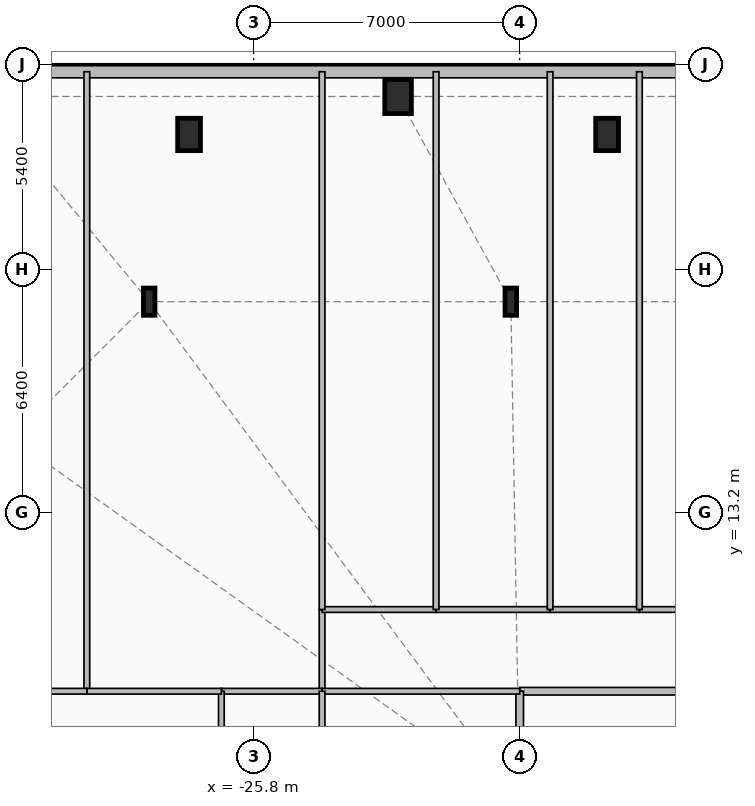
"""IFC4 building model, lengths in metres.
Left out: names, types, materials, properties, quantities, classifications, styles, units other than length and angle.
Written with IfcOpenShell. Run it as: python <this file> out.ifc"""

import sys

from ifc_helpers import new_model, si_unit, direction, frame, frame_2d, origin, origin_2d, place, context, subcontext, project, spatial, rectangle, i_section, extrude, element, fill, save


model = new_model("IFC4")
c1 = context("Model", 3, precision=1e-05, world=origin(), true_north=direction((0.0, 1.0)))
c2 = subcontext(c1, "Body", "Model", "MODEL_VIEW")
j1 = project(units=[si_unit("LENGTHUNIT", "METRE"), si_unit("PLANEANGLEUNIT", "RADIAN")], contexts=[c1])
p1 = place(None, origin())
s1 = spatial("IfcSite", under=j1, at=p1, CompositionType="ELEMENT")
p2 = place(p1, origin())
s2 = spatial("IfcBuilding", under=s1, at=p2, CompositionType="ELEMENT")
p3 = place(p2, frame((0.0, 0.0, 22.5)))
s3 = spatial("IfcBuildingStorey", under=s2, at=p3, CompositionType="ELEMENT", Elevation=22.5)
p4 = place(p3, frame((-22.0, 24.15, 0.0), z_axis=(0.0, 0.0, 1.0), x_axis=(1.0, 0.0, 0.0)))
e1 = element("IfcColumn", 1, at=p4, inside=s3, PredefinedType="COLUMN", context=c2, shape_type="SweptSolid", body=[
    extrude(rectangle(XDim=0.7, YDim=0.9, at=origin_2d()), origin(), (0.0, 0.0, 1.0), 4.5),
])
for number, where, z_axis, x_axis in (
    (2, (-27.5, 23.15, 0.0), (0.0, 0.0, 1.0), (1.0, 0.0, 0.0)),
    (3, (-16.5, 23.15, 0.0), (0.0, 0.0, 1.0), (1.0, 0.0, 0.0)),
):
    element("IfcColumn", number, at=place(p3, frame(where, z_axis=z_axis, x_axis=x_axis)), inside=s3, PredefinedType="PILASTER", context=c2, shape_type="SweptSolid", body=[
        extrude(rectangle(XDim=0.6, YDim=0.85, at=origin_2d()), origin(), (0.0, 0.0, 1.0), 4.5),
    ])
for number, where, z_axis, x_axis in (
    (4, (-19.033, 18.75, 0.0), (0.0, 0.0, 1.0), (1.0, 0.0, 0.0)),
    (5, (-28.55, 18.75, 0.0), (0.0, 0.0, 1.0), (1.0, 0.0, 0.0)),
):
    element("IfcColumn", number, at=place(p3, frame(where, z_axis=z_axis, x_axis=x_axis)), inside=s3, PredefinedType="COLUMN", context=c2, shape_type="SweptSolid", body=[
        extrude(i_section(OverallWidth=0.304, OverallDepth=0.716, WebThickness=0.021, FlangeThickness=0.04, FilletRadius=0.027, at=origin_2d()), origin(), (0.0, 0.0, 1.0), 4.5),
    ])
p5 = place(p3, frame((-36.8, 24.8, 0.0), z_axis=(0.0, 0.0, 1.0), x_axis=(1.0, 0.0, 0.0)))
e6 = element("IfcWall", 6, at=p5, inside=s3, PredefinedType="SOLIDWALL", context=c2, shape_type="SweptSolid", body=[
    extrude(rectangle(XDim=73.6, YDim=0.32, at=frame_2d((36.8, 0.0))), origin(), (0.0, 0.0, 1.0), 4.16),
])
p6 = place(p5, frame((1.079, 0.0, 0.85)))
e7 = element("IfcOpeningElement", 7, at=p6, cuts=e6, PredefinedType="OPENING", context=c2, shape_type="SweptSolid", body=[
    extrude(rectangle(XDim=2.3, YDim=2.4, at=frame_2d((1.15, 1.2))), frame((0.0, 0.17, 0.0), z_axis=(0.0, -1.0, 0.0), x_axis=(1.0, 0.0, 0.0)), (0.0, 0.0, 1.0), 0.34),
])
p7 = place(p5, frame((8.431, 0.0, 0.85)))
e8 = element("IfcOpeningElement", 8, at=p7, cuts=e6, PredefinedType="OPENING", context=c2, shape_type="SweptSolid", body=[
    extrude(rectangle(XDim=2.6, YDim=2.4, at=frame_2d((1.3, 1.2))), frame((0.0, 0.17, 0.0), z_axis=(0.0, -1.0, 0.0), x_axis=(1.0, 0.0, 0.0)), (0.0, 0.0, 1.0), 0.34),
])
p8 = place(p5, frame((13.316, 0.0, 0.85)))
e9 = element("IfcOpeningElement", 9, at=p8, cuts=e6, PredefinedType="OPENING", context=c2, shape_type="SweptSolid", body=[
    extrude(rectangle(XDim=1.1, YDim=1.85, at=frame_2d((0.55, 0.925))), frame((0.0, 0.17, 0.0), z_axis=(0.0, -1.0, 0.0), x_axis=(1.0, 0.0, 0.0)), (0.0, 0.0, 1.0), 0.34),
])
p9 = place(p5, frame((16.339, 0.0, 0.85)))
e10 = element("IfcOpeningElement", 10, at=p9, cuts=e6, PredefinedType="OPENING", context=c2, shape_type="SweptSolid", body=[
    extrude(rectangle(XDim=2.0, YDim=2.4, at=frame_2d((1.0, 1.2))), frame((0.0, 0.17, 0.0), z_axis=(0.0, -1.0, 0.0), x_axis=(1.0, 0.0, 0.0)), (0.0, 0.0, 1.0), 0.34),
])
p10 = place(p5, frame((21.875, 0.0, 0.85)))
e11 = element("IfcOpeningElement", 11, at=p10, cuts=e6, PredefinedType="OPENING", context=c2, shape_type="SweptSolid", body=[
    extrude(rectangle(XDim=2.3, YDim=2.4, at=frame_2d((1.15, 1.2))), frame((0.0, 0.17, 0.0), z_axis=(0.0, -1.0, 0.0), x_axis=(1.0, 0.0, 0.0)), (0.0, 0.0, 1.0), 0.34),
])
p11 = place(p5, frame((26.53, 0.0, 0.85)))
e12 = element("IfcOpeningElement", 12, at=p11, cuts=e6, PredefinedType="OPENING", context=c2, shape_type="SweptSolid", body=[
    extrude(rectangle(XDim=2.6, YDim=2.4, at=frame_2d((1.3, 1.2))), frame((0.0, 0.17, 0.0), z_axis=(0.0, -1.0, 0.0), x_axis=(1.0, 0.0, 0.0)), (0.0, 0.0, 1.0), 0.34),
])
p12 = place(p5, frame((32.537, 0.0, 0.85)))
e13 = element("IfcOpeningElement", 13, at=p12, cuts=e6, PredefinedType="OPENING", context=c2, shape_type="SweptSolid", body=[
    extrude(rectangle(XDim=2.6, YDim=2.4, at=frame_2d((1.3, 1.2))), frame((0.0, 0.17, 0.0), z_axis=(0.0, -1.0, 0.0), x_axis=(1.0, 0.0, 0.0)), (0.0, 0.0, 1.0), 0.34),
])
p13 = place(p5, frame((38.543, 0.0, 0.85)))
e14 = element("IfcOpeningElement", 14, at=p13, cuts=e6, PredefinedType="OPENING", context=c2, shape_type="SweptSolid", body=[
    extrude(rectangle(XDim=2.6, YDim=2.4, at=frame_2d((1.3, 1.2))), frame((0.0, 0.17, 0.0), z_axis=(0.0, -1.0, 0.0), x_axis=(1.0, 0.0, 0.0)), (0.0, 0.0, 1.0), 0.34),
])
p14 = place(p5, frame((44.55, 0.0, 0.85)))
e15 = element("IfcOpeningElement", 15, at=p14, cuts=e6, PredefinedType="OPENING", context=c2, shape_type="SweptSolid", body=[
    extrude(rectangle(XDim=2.6, YDim=2.4, at=frame_2d((1.3, 1.2))), frame((0.0, 0.17, 0.0), z_axis=(0.0, -1.0, 0.0), x_axis=(1.0, 0.0, 0.0)), (0.0, 0.0, 1.0), 0.34),
])
p15 = place(p5, frame((50.556, 0.0, 0.85)))
e16 = element("IfcOpeningElement", 16, at=p15, cuts=e6, PredefinedType="OPENING", context=c2, shape_type="SweptSolid", body=[
    extrude(rectangle(XDim=2.6, YDim=2.4, at=frame_2d((1.3, 1.2))), frame((0.0, 0.17, 0.0), z_axis=(0.0, -1.0, 0.0), x_axis=(1.0, 0.0, 0.0)), (0.0, 0.0, 1.0), 0.34),
])
p16 = place(p5, frame((55.341, 0.0, 0.85)))
e17 = element("IfcOpeningElement", 17, at=p16, cuts=e6, PredefinedType="OPENING", context=c2, shape_type="SweptSolid", body=[
    extrude(rectangle(XDim=2.0, YDim=2.4, at=frame_2d((1.0, 1.2))), frame((0.0, 0.17, 0.0), z_axis=(0.0, -1.0, 0.0), x_axis=(1.0, 0.0, 0.0)), (0.0, 0.0, 1.0), 0.34),
])
p17 = place(p5, frame((59.16, 0.0, 0.85)))
e18 = element("IfcOpeningElement", 18, at=p17, cuts=e6, PredefinedType="OPENING", context=c2, shape_type="SweptSolid", body=[
    extrude(rectangle(XDim=1.1, YDim=1.85, at=frame_2d((0.55, 0.925))), frame((0.0, 0.17, 0.0), z_axis=(0.0, -1.0, 0.0), x_axis=(1.0, 0.0, 0.0)), (0.0, 0.0, 1.0), 0.34),
])
p18 = place(p5, frame((62.649, 0.0, 0.85)))
e19 = element("IfcOpeningElement", 19, at=p18, cuts=e6, PredefinedType="OPENING", context=c2, shape_type="SweptSolid", body=[
    extrude(rectangle(XDim=2.6, YDim=2.4, at=frame_2d((1.3, 1.2))), frame((0.0, 0.17, 0.0), z_axis=(0.0, -1.0, 0.0), x_axis=(1.0, 0.0, 0.0)), (0.0, 0.0, 1.0), 0.34),
])
p19 = place(p5, frame((70.301, 0.0, 0.85)))
e20 = element("IfcOpeningElement", 20, at=p19, cuts=e6, PredefinedType="OPENING", context=c2, shape_type="SweptSolid", body=[
    extrude(rectangle(XDim=2.3, YDim=2.4, at=frame_2d((1.15, 1.2))), frame((0.0, 0.17, 0.0), z_axis=(0.0, -1.0, 0.0), x_axis=(1.0, 0.0, 0.0)), (0.0, 0.0, 1.0), 0.34),
])
p20 = place(p3, frame((-12.0, 8.5, 0.0), z_axis=(0.0, 0.0, 1.0), x_axis=(-1.0, 0.0, 0.0)))
e21 = element("IfcWall", 21, at=p20, inside=s3, PredefinedType="PARTITIONING", context=c2, shape_type="SweptSolid", body=[
    extrude(rectangle(XDim=6.8, YDim=0.2, at=frame_2d((3.4, 0.0))), origin(), (0.0, 0.0, 1.0), 4.16),
])
p21 = place(p20, frame((1.715, 0.0, 0.0)))
e22 = element("IfcOpeningElement", 22, at=p21, cuts=e21, PredefinedType="OPENING", context=c2, shape_type="SweptSolid", body=[
    extrude(rectangle(XDim=1.1, YDim=2.15, at=frame_2d((0.55, 1.075))), frame((0.0, 0.11, 0.0), z_axis=(0.0, -1.0, 0.0), x_axis=(1.0, 0.0, 0.0)), (0.0, 0.0, 1.0), 0.22),
])
p22 = place(p3, frame((-18.8, 8.5, 0.0), z_axis=(0.0, 0.0, 1.0), x_axis=(0.0, -1.0, 0.0)))
e23 = element("IfcWall", 23, at=p22, inside=s3, PredefinedType="PARTITIONING", context=c2, shape_type="SweptSolid", body=[
    extrude(rectangle(XDim=2.9, YDim=0.2, at=frame_2d((1.45, 0.0))), origin(), (0.0, 0.0, 1.0), 3.645),
])
p23 = place(p3, frame((-24.0, 8.5, 0.0), z_axis=(0.0, 0.0, 1.0), x_axis=(0.0, 1.0, 0.0)))
e24 = element("IfcWall", 24, at=p23, inside=s3, PredefinedType="PARTITIONING", context=c2, shape_type="SweptSolid", body=[
    extrude(rectangle(XDim=2.15, YDim=0.15, at=frame_2d((1.075, 0.0))), origin(), (0.0, 0.0, 1.0), 4.16),
])
p24 = place(p23, frame((0.625, 0.0, 0.0)))
e25 = element("IfcOpeningElement", 25, at=p24, cuts=e24, PredefinedType="OPENING", context=c2, shape_type="SweptSolid", body=[
    extrude(rectangle(XDim=0.9, YDim=2.1, at=frame_2d((0.45, 1.05))), frame((0.0, 0.085, 0.0), z_axis=(0.0, -1.0, 0.0), x_axis=(1.0, 0.0, 0.0)), (0.0, 0.0, 1.0), 0.17),
])
p25 = place(p3, frame((-18.8, 8.5, 0.0), z_axis=(0.0, 0.0, 1.0), x_axis=(-1.0, 0.0, 0.0)))
e26 = element("IfcWall", 26, at=p25, inside=s3, PredefinedType="PARTITIONING", context=c2, shape_type="SweptSolid", body=[
    extrude(rectangle(XDim=5.2, YDim=0.15, at=frame_2d((2.6, 0.0))), origin(), (0.0, 0.0, 1.0), 4.16),
])
p26 = place(p25, frame((3.196, 0.0, 0.0)))
e27 = element("IfcOpeningElement", 27, at=p26, cuts=e26, PredefinedType="OPENING", context=c2, shape_type="SweptSolid", body=[
    extrude(rectangle(XDim=1.05, YDim=2.15, at=frame_2d((0.525, 1.075))), frame((0.0, 0.085, 0.0), z_axis=(0.0, -1.0, 0.0), x_axis=(1.0, 0.0, 0.0)), (0.0, 0.0, 1.0), 0.17),
])
p27 = place(p3, frame((-24.0, 10.65, 0.0), z_axis=(0.0, 0.0, 1.0), x_axis=(1.0, 0.0, 0.0)))
e28 = element("IfcWall", 28, at=p27, inside=s3, PredefinedType="PARTITIONING", context=c2, shape_type="SweptSolid", body=[
    extrude(rectangle(XDim=3.0, YDim=0.15, at=frame_2d((1.5, 0.0))), origin(), (0.0, 0.0, 1.0), 4.16),
])
p28 = place(p27, frame((0.679, 0.0, 0.0)))
e29 = element("IfcOpeningElement", 29, at=p28, cuts=e28, PredefinedType="OPENING", context=c2, shape_type="SweptSolid", body=[
    extrude(rectangle(XDim=1.05, YDim=2.15, at=frame_2d((0.525, 1.075))), frame((0.0, 0.085, 0.0), z_axis=(0.0, -1.0, 0.0), x_axis=(1.0, 0.0, 0.0)), (0.0, 0.0, 1.0), 0.17),
])
p29 = place(p3, frame((-21.0, 10.65, 0.0), z_axis=(0.0, 0.0, 1.0), x_axis=(1.0, 0.0, 0.0)))
e30 = element("IfcWall", 30, at=p29, inside=s3, PredefinedType="PARTITIONING", context=c2, shape_type="SweptSolid", body=[
    extrude(rectangle(XDim=3.0, YDim=0.15, at=frame_2d((1.5, 0.0))), origin(), (0.0, 0.0, 1.0), 4.16),
])
p30 = place(p29, frame((0.679, 0.0, 0.0)))
e31 = element("IfcOpeningElement", 31, at=p30, cuts=e30, PredefinedType="OPENING", context=c2, shape_type="SweptSolid", body=[
    extrude(rectangle(XDim=1.05, YDim=2.15, at=frame_2d((0.525, 1.075))), frame((0.0, 0.085, 0.0), z_axis=(0.0, -1.0, 0.0), x_axis=(1.0, 0.0, 0.0)), (0.0, 0.0, 1.0), 0.17),
])
p31 = place(p3, frame((-18.0, 10.65, 0.0), z_axis=(0.0, 0.0, 1.0), x_axis=(1.0, 0.0, 0.0)))
e32 = element("IfcWall", 32, at=p31, inside=s3, PredefinedType="PLUMBINGWALL", context=c2, shape_type="SweptSolid", body=[
    extrude(rectangle(XDim=2.35, YDim=0.15, at=frame_2d((1.175, 0.0))), origin(), (0.0, 0.0, 1.0), 4.16),
])
p32 = place(p31, frame((0.834, 0.0, 0.0)))
e33 = element("IfcOpeningElement", 33, at=p32, cuts=e32, PredefinedType="OPENING", context=c2, shape_type="SweptSolid", body=[
    extrude(rectangle(XDim=0.9, YDim=2.1, at=frame_2d((0.45, 1.05))), frame((0.0, 0.085, 0.0), z_axis=(0.0, -1.0, 0.0), x_axis=(1.0, 0.0, 0.0)), (0.0, 0.0, 1.0), 0.17),
])
p33 = place(p3, frame((-15.65, 10.65, 0.0), z_axis=(0.0, 0.0, 1.0), x_axis=(1.0, 0.0, 0.0)))
e34 = element("IfcWall", 34, at=p33, inside=s3, PredefinedType="PARTITIONING", context=c2, shape_type="SweptSolid", body=[
    extrude(rectangle(XDim=3.65, YDim=0.15, at=frame_2d((1.825, 0.0))), origin(), (0.0, 0.0, 1.0), 4.16),
])
p34 = place(p33, frame((1.157, 0.0, 0.0)))
e35 = element("IfcOpeningElement", 35, at=p34, cuts=e34, PredefinedType="OPENING", context=c2, shape_type="SweptSolid", body=[
    extrude(rectangle(XDim=0.95, YDim=2.1, at=frame_2d((0.475, 1.05))), frame((0.0, 0.085, 0.0), z_axis=(0.0, -1.0, 0.0), x_axis=(1.0, 0.0, 0.0)), (0.0, 0.0, 1.0), 0.17),
])
p35 = place(p3, frame((-26.65, 8.5, 0.0), z_axis=(0.0, 0.0, 1.0), x_axis=(1.0, 0.0, 0.0)))
e36 = element("IfcWall", 36, at=p35, inside=s3, PredefinedType="PARTITIONING", context=c2, shape_type="SweptSolid", body=[
    extrude(rectangle(XDim=2.65, YDim=0.15, at=frame_2d((1.325, 0.0))), origin(), (0.0, 0.0, 1.0), 4.16),
])
p36 = place(p35, frame((0.635, 0.0, 0.0)))
e37 = element("IfcOpeningElement", 37, at=p36, cuts=e36, PredefinedType="OPENING", context=c2, shape_type="SweptSolid", body=[
    extrude(rectangle(XDim=1.05, YDim=2.15, at=frame_2d((0.525, 1.075))), frame((0.0, 0.085, 0.0), z_axis=(0.0, -1.0, 0.0), x_axis=(1.0, 0.0, 0.0)), (0.0, 0.0, 1.0), 0.17),
])
p37 = place(p3, frame((-26.65, 6.385, 0.0), z_axis=(0.0, 0.0, 1.0), x_axis=(0.0, 1.0, 0.0)))
e38 = element("IfcWall", 38, at=p37, inside=s3, PredefinedType="PARTITIONING", context=c2, shape_type="SweptSolid", body=[
    extrude(rectangle(XDim=2.115, YDim=0.15, at=frame_2d((1.058, 0.0))), origin(), (0.0, 0.0, 1.0), 4.16),
])
p38 = place(p37, frame((0.583, 0.0, 0.0)))
e39 = element("IfcOpeningElement", 39, at=p38, cuts=e38, PredefinedType="OPENING", context=c2, shape_type="SweptSolid", body=[
    extrude(rectangle(XDim=0.95, YDim=2.1, at=frame_2d((0.475, 1.05))), frame((0.0, 0.085, 0.0), z_axis=(0.0, -1.0, 0.0), x_axis=(1.0, 0.0, 0.0)), (0.0, 0.0, 1.0), 0.17),
])
p39 = place(p3, frame((-24.0, 8.5, 0.0), z_axis=(0.0, 0.0, 1.0), x_axis=(0.0, -1.0, 0.0)))
e40 = element("IfcWall", 40, at=p39, inside=s3, PredefinedType="PARTITIONING", context=c2, shape_type="SweptSolid", body=[
    extrude(rectangle(XDim=14.1, YDim=0.15, at=frame_2d((7.05, 0.0))), origin(), (0.0, 0.0, 1.0), 4.16),
])
p40 = place(p3, frame((-30.19, 8.5, 0.0), z_axis=(0.0, 0.0, 1.0), x_axis=(0.0, 1.0, 0.0)))
e41 = element("IfcWall", 41, at=p40, inside=s3, PredefinedType="PARTITIONING", context=c2, shape_type="SweptSolid", body=[
    extrude(rectangle(XDim=16.3, YDim=0.15, at=frame_2d((8.15, 0.0))), origin(), (0.0, 0.0, 1.0), 4.16),
])
p41 = place(p40, frame((2.341, 0.0, 0.0)))
e42 = element("IfcOpeningElement", 42, at=p41, cuts=e41, PredefinedType="OPENING", context=c2, shape_type="SweptSolid", body=[
    extrude(rectangle(XDim=1.05, YDim=2.15, at=frame_2d((0.525, 1.075))), frame((0.0, 0.085, 0.0), z_axis=(0.0, -1.0, 0.0), x_axis=(1.0, 0.0, 0.0)), (0.0, 0.0, 1.0), 0.17),
])
p42 = place(p3, frame((-26.65, 8.5, 0.0), z_axis=(0.0, 0.0, 1.0), x_axis=(-1.0, 0.0, 0.0)))
e43 = element("IfcWall", 43, at=p42, inside=s3, PredefinedType="PARTITIONING", context=c2, shape_type="SweptSolid", body=[
    extrude(rectangle(XDim=3.54, YDim=0.15, at=frame_2d((1.77, 0.0))), origin(), (0.0, 0.0, 1.0), 4.16),
])
p43 = place(p3, frame((-24.0, 24.8, 0.0), z_axis=(0.0, 0.0, 1.0), x_axis=(0.0, -1.0, 0.0)))
e44 = element("IfcWall", 44, at=p43, inside=s3, PredefinedType="PARTITIONING", context=c2, shape_type="SweptSolid", body=[
    extrude(rectangle(XDim=14.15, YDim=0.15, at=frame_2d((7.075, 0.0))), origin(), (0.0, 0.0, 1.0), 4.16),
])
p44 = place(p3, frame((-30.19, 8.5, 0.0), z_axis=(0.0, 0.0, 1.0), x_axis=(-1.0, 0.0, 0.0)))
e45 = element("IfcWall", 45, at=p44, inside=s3, PredefinedType="PARTITIONING", context=c2, shape_type="SweptSolid", body=[
    extrude(rectangle(XDim=6.61, YDim=0.15, at=frame_2d((3.305, 0.0))), origin(), (0.0, 0.0, 1.0), 4.16),
])
p45 = place(p3, frame((-21.0, 24.8, 0.0), z_axis=(0.0, 0.0, 1.0), x_axis=(0.0, -1.0, 0.0)))
e46 = element("IfcWall", 46, at=p45, inside=s3, PredefinedType="PARTITIONING", context=c2, shape_type="SweptSolid", body=[
    extrude(rectangle(XDim=14.15, YDim=0.15, at=frame_2d((7.075, 0.0))), origin(), (0.0, 0.0, 1.0), 4.16),
])
for number, where, z_axis, x_axis in (
    (47, (-18.0, 24.8, 0.0), (0.0, 0.0, 1.0), (0.0, -1.0, 0.0)),
    (48, (-15.65, 24.8, 0.0), (0.0, 0.0, 1.0), (0.0, -1.0, 0.0)),
):
    element("IfcWall", number, at=place(p3, frame(where, z_axis=z_axis, x_axis=x_axis)), inside=s3, PredefinedType="PLUMBINGWALL", context=c2, shape_type="SweptSolid", body=[
        extrude(rectangle(XDim=14.15, YDim=0.15, at=frame_2d((7.075, 0.0))), origin(), (0.0, 0.0, 1.0), 4.16),
    ])
p46 = place(p7, origin())
e49 = element("IfcWindow", 49, at=p46, inside=s3, PartitioningType="SINGLE_PANEL", PredefinedType="WINDOW", context=c2, shape_type="SweptSolid", body=[
    extrude(rectangle(XDim=2.6, YDim=2.4, at=frame_2d((1.3, 1.2))), frame((0.0, 0.03, 0.0), z_axis=(0.0, -1.0, 0.0), x_axis=(1.0, 0.0, 0.0)), (0.0, 0.0, 1.0), 0.06),
])
fill(e8, e49)
p47 = place(p8, origin())
e50 = element("IfcWindow", 50, at=p47, inside=s3, PartitioningType="SINGLE_PANEL", PredefinedType="WINDOW", context=c2, shape_type="SweptSolid", body=[
    extrude(rectangle(XDim=1.1, YDim=1.85, at=frame_2d((0.55, 0.925))), frame((0.0, 0.03, 0.0), z_axis=(0.0, -1.0, 0.0), x_axis=(1.0, 0.0, 0.0)), (0.0, 0.0, 1.0), 0.06),
])
fill(e9, e50)
p48 = place(p9, origin())
e51 = element("IfcWindow", 51, at=p48, inside=s3, PartitioningType="SINGLE_PANEL", PredefinedType="WINDOW", context=c2, shape_type="SweptSolid", body=[
    extrude(rectangle(XDim=2.0, YDim=2.4, at=frame_2d((1.0, 1.2))), frame((0.0, 0.03, 0.0), z_axis=(0.0, -1.0, 0.0), x_axis=(1.0, 0.0, 0.0)), (0.0, 0.0, 1.0), 0.06),
])
fill(e10, e51)
p49 = place(p10, origin())
e52 = element("IfcWindow", 52, at=p49, inside=s3, PartitioningType="SINGLE_PANEL", PredefinedType="WINDOW", context=c2, shape_type="SweptSolid", body=[
    extrude(rectangle(XDim=2.3, YDim=2.4, at=frame_2d((1.15, 1.2))), frame((0.0, 0.03, 0.0), z_axis=(0.0, -1.0, 0.0), x_axis=(1.0, 0.0, 0.0)), (0.0, 0.0, 1.0), 0.06),
])
fill(e11, e52)
p50 = place(p21, origin())
e53 = element("IfcDoor", 53, at=p50, inside=s3, OperationType="SINGLE_SWING_RIGHT", PredefinedType="DOOR", context=c2, shape_type="SweptSolid", body=[
    extrude(rectangle(XDim=1.1, YDim=2.15, at=frame_2d((0.55, 1.075))), frame((0.0, 0.025, 0.0), z_axis=(0.0, -1.0, 0.0), x_axis=(1.0, 0.0, 0.0)), (0.0, 0.0, 1.0), 0.05),
])
fill(e22, e53)
p51 = place(p24, origin())
e54 = element("IfcDoor", 54, at=p51, inside=s3, OperationType="SINGLE_SWING_LEFT", PredefinedType="DOOR", context=c2, shape_type="SweptSolid", body=[
    extrude(rectangle(XDim=0.9, YDim=2.1, at=frame_2d((0.45, 1.05))), frame((0.0, 0.025, 0.0), z_axis=(0.0, -1.0, 0.0), x_axis=(1.0, 0.0, 0.0)), (0.0, 0.0, 1.0), 0.05),
])
fill(e25, e54)
p52 = place(p26, origin())
e55 = element("IfcDoor", 55, at=p52, inside=s3, OperationType="SINGLE_SWING_RIGHT", PredefinedType="DOOR", context=c2, shape_type="SweptSolid", body=[
    extrude(rectangle(XDim=1.05, YDim=2.15, at=frame_2d((0.525, 1.075))), frame((0.0, 0.025, 0.0), z_axis=(0.0, -1.0, 0.0), x_axis=(1.0, 0.0, 0.0)), (0.0, 0.0, 1.0), 0.05),
])
fill(e27, e55)
p53 = place(p28, origin())
e56 = element("IfcDoor", 56, at=p53, inside=s3, OperationType="SINGLE_SWING_LEFT", PredefinedType="DOOR", context=c2, shape_type="SweptSolid", body=[
    extrude(rectangle(XDim=1.05, YDim=2.15, at=frame_2d((0.525, 1.075))), frame((0.0, 0.025, 0.0), z_axis=(0.0, -1.0, 0.0), x_axis=(1.0, 0.0, 0.0)), (0.0, 0.0, 1.0), 0.05),
])
fill(e29, e56)
p54 = place(p30, origin())
e57 = element("IfcDoor", 57, at=p54, inside=s3, OperationType="SINGLE_SWING_RIGHT", PredefinedType="DOOR", context=c2, shape_type="SweptSolid", body=[
    extrude(rectangle(XDim=1.05, YDim=2.15, at=frame_2d((0.525, 1.075))), frame((0.0, 0.025, 0.0), z_axis=(0.0, -1.0, 0.0), x_axis=(1.0, 0.0, 0.0)), (0.0, 0.0, 1.0), 0.05),
])
fill(e31, e57)
p55 = place(p32, origin())
e58 = element("IfcDoor", 58, at=p55, inside=s3, OperationType="SINGLE_SWING_LEFT", PredefinedType="DOOR", context=c2, shape_type="SweptSolid", body=[
    extrude(rectangle(XDim=0.9, YDim=2.1, at=frame_2d((0.45, 1.05))), frame((0.0, 0.025, 0.0), z_axis=(0.0, -1.0, 0.0), x_axis=(1.0, 0.0, 0.0)), (0.0, 0.0, 1.0), 0.05),
])
fill(e33, e58)
p56 = place(p36, origin())
e59 = element("IfcDoor", 59, at=p56, inside=s3, OperationType="SINGLE_SWING_RIGHT", PredefinedType="DOOR", context=c2, shape_type="SweptSolid", body=[
    extrude(rectangle(XDim=1.05, YDim=2.15, at=frame_2d((0.525, 1.075))), frame((0.0, 0.025, 0.0), z_axis=(0.0, -1.0, 0.0), x_axis=(1.0, 0.0, 0.0)), (0.0, 0.0, 1.0), 0.05),
])
fill(e37, e59)
p57 = place(p38, origin())
e60 = element("IfcDoor", 60, at=p57, inside=s3, OperationType="SINGLE_SWING_LEFT", PredefinedType="DOOR", context=c2, shape_type="SweptSolid", body=[
    extrude(rectangle(XDim=0.95, YDim=2.1, at=frame_2d((0.475, 1.05))), frame((0.0, 0.025, 0.0), z_axis=(0.0, -1.0, 0.0), x_axis=(1.0, 0.0, 0.0)), (0.0, 0.0, 1.0), 0.05),
])
fill(e39, e60)
p58 = place(p41, origin())
e61 = element("IfcDoor", 61, at=p58, inside=s3, OperationType="SINGLE_SWING_RIGHT", PredefinedType="DOOR", context=c2, shape_type="SweptSolid", body=[
    extrude(rectangle(XDim=1.05, YDim=2.15, at=frame_2d((0.525, 1.075))), frame((0.0, 0.025, 0.0), z_axis=(0.0, -1.0, 0.0), x_axis=(1.0, 0.0, 0.0)), (0.0, 0.0, 1.0), 0.05),
])
fill(e42, e61)
save(model, sys.argv[1])
